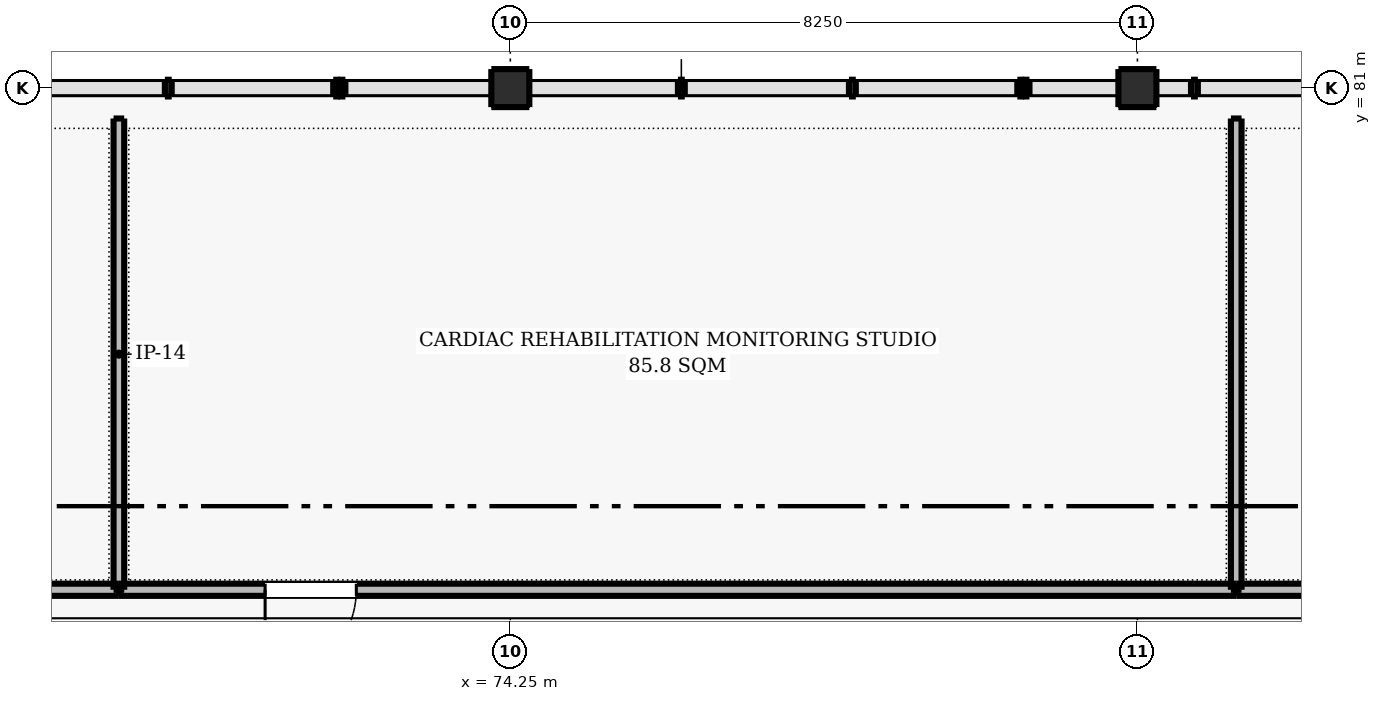
"""IFC4 building model, lengths in metres.
Left out: names, types, materials, properties, quantities, classifications, styles, units other than length and angle.
Written with IfcOpenShell. Run it as: python <this file> out.ifc"""

import sys

from ifc_helpers import new_model, si_unit, direction, frame, frame_2d, origin, origin_2d, place, context, subcontext, project, spatial, rectangle, hollow_circle, extrude, element, fill, save


model = new_model("IFC4")
c1 = context("Model", 3, precision=1e-05, world=origin(), true_north=direction((0.0, 1.0)))
c2 = subcontext(c1, "Body", "Model", "MODEL_VIEW")
j1 = project(units=[si_unit("LENGTHUNIT", "METRE"), si_unit("PLANEANGLEUNIT", "RADIAN")], contexts=[c1])
p1 = place(None, origin())
s1 = spatial("IfcSite", under=j1, at=p1, CompositionType="ELEMENT")
p2 = place(p1, origin())
s2 = spatial("IfcBuilding", under=s1, at=p2, CompositionType="ELEMENT")
p3 = place(p2, frame((0.0, 0.0, 5.1)))
s3 = spatial("IfcBuildingStorey", under=s2, at=p3, CompositionType="ELEMENT", Elevation=5.1)
for number, where, z_axis, x_axis in (
    (1, (74.25, 81.0, 0.0), (0.0, 0.0, 1.0), (1.0, 0.0, 0.0)),
    (2, (82.5, 81.0, 0.0), (0.0, 0.0, 1.0), (1.0, 0.0, 0.0)),
):
    element("IfcColumn", number, at=place(p3, frame(where, z_axis=z_axis, x_axis=x_axis)), inside=s3, PredefinedType="COLUMN", context=c2, shape_type="SweptSolid", body=[
        extrude(hollow_circle(Radius=0.162, WallThickness=0.016, at=origin_2d()), origin(), (0.0, 0.0, 1.0), 4.5),
    ])
p4 = place(p3, frame((54.4, 74.4, 0.0), z_axis=(0.0, 0.0, 1.0), x_axis=(1.0, 0.0, 0.0)))
e3 = element("IfcWall", 3, at=p4, inside=s3, PredefinedType="PARTITIONING", context=c2, shape_type="SweptSolid", body=[
    extrude(rectangle(XDim=14.7, YDim=0.16, at=frame_2d((7.35, 0.0))), origin(), (0.0, 0.0, 1.0), 4.21),
])
p5 = place(p4, frame((11.83, 0.0, 0.0)))
e4 = element("IfcOpeningElement", 4, at=p5, cuts=e3, PredefinedType="OPENING", context=c2, shape_type="SweptSolid", body=[
    extrude(rectangle(XDim=1.2, YDim=2.2, at=frame_2d((0.6, 1.1))), frame((0.0, 0.09, 0.0), z_axis=(0.0, -1.0, 0.0), x_axis=(1.0, 0.0, 0.0)), (0.0, 0.0, 1.0), 0.18),
])
p6 = place(p3, frame((69.1, 74.4, 0.0), z_axis=(0.0, 0.0, 1.0), x_axis=(0.0, 1.0, 0.0)))
e5 = element("IfcWall", 5, at=p6, inside=s3, PredefinedType="PARTITIONING", context=c2, shape_type="SweptSolid", body=[
    extrude(rectangle(XDim=6.2, YDim=0.14, at=frame_2d((3.1, 0.0))), origin(), (0.0, 0.0, 1.0), 4.21),
])
p7 = place(p3, frame((69.1, 74.4, 0.0), z_axis=(0.0, 0.0, 1.0), x_axis=(1.0, 0.0, 0.0)))
e6 = element("IfcWall", 6, at=p7, inside=s3, PredefinedType="PARTITIONING", context=c2, shape_type="SweptSolid", body=[
    extrude(rectangle(XDim=14.7, YDim=0.16, at=frame_2d((7.35, 0.0))), origin(), (0.0, 0.0, 1.0), 4.21),
])
p8 = place(p7, frame((1.924, 0.0, 0.0)))
e7 = element("IfcOpeningElement", 7, at=p8, cuts=e6, PredefinedType="OPENING", context=c2, shape_type="SweptSolid", body=[
    extrude(rectangle(XDim=1.2, YDim=2.2, at=frame_2d((0.6, 1.1))), frame((0.0, 0.09, 0.0), z_axis=(0.0, -1.0, 0.0), x_axis=(1.0, 0.0, 0.0)), (0.0, 0.0, 1.0), 0.18),
])
p9 = place(p3, frame((83.8, 74.4, 0.0), z_axis=(0.0, 0.0, 1.0), x_axis=(0.0, 1.0, 0.0)))
e8 = element("IfcWall", 8, at=p9, inside=s3, PredefinedType="PARTITIONING", context=c2, shape_type="SweptSolid", body=[
    extrude(rectangle(XDim=6.2, YDim=0.14, at=frame_2d((3.1, 0.0))), origin(), (0.0, 0.0, 1.0), 4.21),
])
p10 = place(p3, frame((83.8, 74.4, 0.0), z_axis=(0.0, 0.0, 1.0), x_axis=(1.0, 0.0, 0.0)))
e9 = element("IfcWall", 9, at=p10, inside=s3, PredefinedType="PARTITIONING", context=c2, shape_type="SweptSolid", body=[
    extrude(rectangle(XDim=14.8, YDim=0.16, at=frame_2d((7.4, 0.0))), origin(), (0.0, 0.0, 1.0), 4.21),
])
p11 = place(p10, frame((9.688, 0.0, 0.0)))
e10 = element("IfcOpeningElement", 10, at=p11, cuts=e9, PredefinedType="OPENING", context=c2, shape_type="SweptSolid", body=[
    extrude(rectangle(XDim=1.1, YDim=2.15, at=frame_2d((0.55, 1.075))), frame((0.0, 0.09, 0.0), z_axis=(0.0, -1.0, 0.0), x_axis=(1.0, 0.0, 0.0)), (0.0, 0.0, 1.0), 0.18),
])
p12 = place(p8, frame((1.2, 0.0, 0.0), z_axis=(0.0, 0.0, 1.0), x_axis=(-1.0, 0.0, 0.0)))
e11 = element("IfcDoor", 11, at=p12, inside=s3, OperationType="SINGLE_SWING_LEFT", PredefinedType="DOOR", context=c2, shape_type="SweptSolid", body=[
    extrude(rectangle(XDim=1.2, YDim=2.2, at=frame_2d((0.6, 1.1))), frame((0.0, 0.025, 0.0), z_axis=(0.0, -1.0, 0.0), x_axis=(1.0, 0.0, 0.0)), (0.0, 0.0, 1.0), 0.05),
])
fill(e7, e11)
save(model, sys.argv[1])
